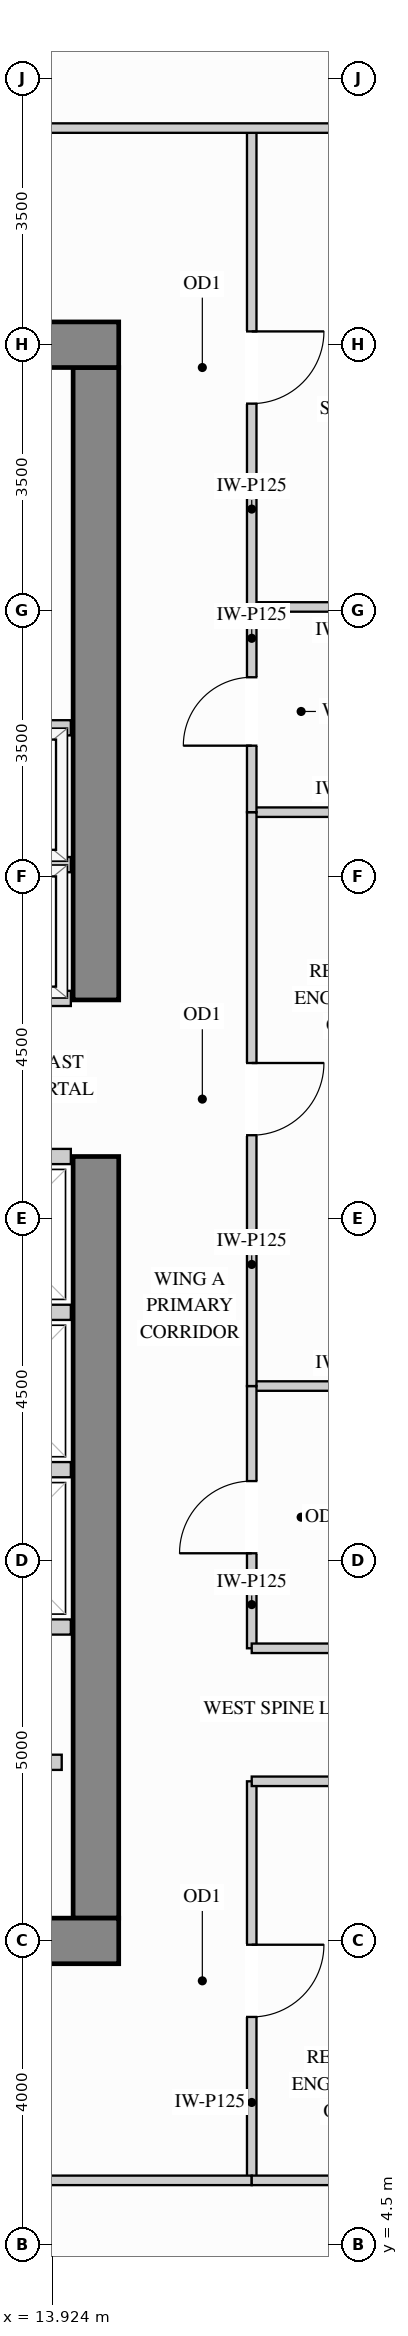
"""IFC4 building model, lengths in metres.
Left out: names, types, materials, properties, quantities, classifications, styles, units other than length and angle.
Written with IfcOpenShell. Run it as: python <this file> out.ifc"""

import sys

from ifc_helpers import new_model, si_unit, direction, frame, frame_2d, origin, place, context, subcontext, project, spatial, rectangle, extrude, source, transform, mapped, element, fill, save


model = new_model("IFC4")
c1 = context("Model", 3, precision=1e-05, world=origin(), true_north=direction((0.0, 1.0)))
c2 = subcontext(c1, "Body", "Model", "MODEL_VIEW")
j1 = project(units=[si_unit("LENGTHUNIT", "METRE"), si_unit("PLANEANGLEUNIT", "RADIAN")], contexts=[c1])
p1 = place(None, origin())
s1 = spatial("IfcSite", under=j1, at=p1, CompositionType="ELEMENT")
p2 = place(p1, origin())
s2 = spatial("IfcBuilding", under=s1, at=p2, CompositionType="ELEMENT")
p3 = place(p2, frame((0.0, 0.0, 186.3)))
s3 = spatial("IfcBuildingStorey", under=s2, at=p3, CompositionType="ELEMENT", Elevation=186.3)
m1 = source(origin(), c2, "Body", "SweptSolid", [
    extrude(rectangle(XDim=10.02, YDim=0.6, at=frame_2d((5.01, 0.0))), origin(), (0.0, 0.0, 1.0), 3.4),
])
p4 = place(p3, frame((14.5, 8.8, 0.0), z_axis=(0.0, 0.0, 1.0), x_axis=(0.0, 1.0, 0.0)))
e1 = element("IfcWall", 1, at=p4, inside=s3, PredefinedType="SHEAR", context=c2, shape_type="MappedRepresentation", body=[
    mapped(m1, transform((0.0, 0.0, 0.0), x_axis=(1.0, 0.0, 0.0), y_axis=(0.0, 1.0, 0.0), z_axis=(0.0, 0.0, 1.0))),
])
m2 = source(origin(), c2, "Body", "SweptSolid", [
    extrude(rectangle(XDim=8.32, YDim=0.6, at=frame_2d((4.16, 0.0))), origin(), (0.0, 0.0, 1.0), 3.4),
])
p5 = place(p3, frame((14.5, 20.88, 0.0), z_axis=(0.0, 0.0, 1.0), x_axis=(0.0, 1.0, 0.0)))
e2 = element("IfcWall", 2, at=p5, inside=s3, PredefinedType="SHEAR", context=c2, shape_type="MappedRepresentation", body=[
    mapped(m2, transform((0.0, 0.0, 0.0), x_axis=(1.0, 0.0, 0.0), y_axis=(0.0, 1.0, 0.0), z_axis=(0.0, 0.0, 1.0))),
])
m3 = source(origin(), c2, "Body", "SweptSolid", [
    extrude(rectangle(XDim=10.6, YDim=0.6, at=frame_2d((5.3, 0.0))), origin(), (0.0, 0.0, 1.0), 3.4),
])
for number, where, z_axis, x_axis in (
    (3, (4.2, 29.5, 0.0), (0.0, 0.0, 1.0), (1.0, 0.0, 0.0)),
    (4, (4.2, 8.5, 0.0), (0.0, 0.0, 1.0), (1.0, 0.0, 0.0)),
):
    element("IfcWall", number, at=place(p3, frame(where, z_axis=z_axis, x_axis=x_axis)), inside=s3, PredefinedType="SHEAR", context=c2, shape_type="MappedRepresentation", body=[
        mapped(m3, transform((0.0, 0.0, 0.0), x_axis=(1.0, 0.0, 0.0), y_axis=(0.0, 1.0, 0.0), z_axis=(0.0, 0.0, 1.0))),
    ])
m4 = source(origin(), c2, "Body", "SweptSolid", [
    extrude(rectangle(XDim=2.6, YDim=0.125, at=frame_2d((1.3, 0.0))), origin(), (0.0, 0.0, 1.0), 3.385),
])
p6 = place(p3, frame((16.55, 15.8, 0.0), z_axis=(0.0, 0.0, 1.0), x_axis=(1.0, 0.0, 0.0)))
e5 = element("IfcWall", 5, at=p6, inside=s3, PredefinedType="PARTITIONING", context=c2, shape_type="MappedRepresentation", body=[
    mapped(m4, transform((0.0, 0.0, 0.0), x_axis=(1.0, 0.0, 0.0), y_axis=(0.0, 1.0, 0.0), z_axis=(0.0, 0.0, 1.0))),
])
m5 = source(origin(), c2, "Body", "SweptSolid", [
    extrude(rectangle(XDim=2.598, YDim=0.125, at=frame_2d((1.299, 0.0))), origin(), (0.0, 0.0, 1.0), 3.385),
])
for number, where, z_axis, x_axis in (
    (6, (16.55, 23.35, 0.0), (0.0, 0.0, 1.0), (1.0, 0.0, 0.0)),
    (7, (16.55, 26.05, 0.0), (0.0, 0.0, 1.0), (1.0, 0.0, 0.0)),
):
    element("IfcWall", number, at=place(p3, frame(where, z_axis=z_axis, x_axis=x_axis)), inside=s3, PredefinedType="PARTITIONING", context=c2, shape_type="MappedRepresentation", body=[
        mapped(m5, transform((0.0, 0.0, 0.0), x_axis=(1.0, 0.0, 0.0), y_axis=(0.0, 1.0, 0.0), z_axis=(0.0, 0.0, 1.0))),
    ])
p7 = place(p3, frame((16.55, 12.35, 0.0), z_axis=(0.0, 0.0, 1.0), x_axis=(0.0, 1.0, 0.0)))
e8 = element("IfcWall", 8, at=p7, inside=s3, PredefinedType="PARTITIONING", context=c2, shape_type="SweptSolid", body=[
    extrude(rectangle(XDim=3.45, YDim=0.125, at=frame_2d((1.725, 0.0))), origin(), (0.0, 0.0, 1.0), 3.385),
])
p8 = place(p7, frame((1.25, 0.0, 0.0)))
e9 = element("IfcOpeningElement", 9, at=p8, cuts=e8, PredefinedType="OPENING", context=c2, shape_type="SweptSolid", body=[
    extrude(rectangle(XDim=0.95, YDim=2.15, at=frame_2d((0.475, 1.075))), frame((0.0, 0.073, 0.0), z_axis=(0.0, -1.0, 0.0), x_axis=(1.0, 0.0, 0.0)), (0.0, 0.0, 1.0), 0.145),
])
p9 = place(p3, frame((16.55, 15.8, 0.0), z_axis=(0.0, 0.0, 1.0), x_axis=(0.0, 1.0, 0.0)))
e10 = element("IfcWall", 10, at=p9, inside=s3, PredefinedType="PARTITIONING", context=c2, shape_type="SweptSolid", body=[
    extrude(rectangle(XDim=7.55, YDim=0.125, at=frame_2d((3.775, 0.0))), origin(), (0.0, 0.0, 1.0), 3.385),
])
p10 = place(p9, frame((3.3, 0.0, 0.0)))
e11 = element("IfcOpeningElement", 11, at=p10, cuts=e10, PredefinedType="OPENING", context=c2, shape_type="SweptSolid", body=[
    extrude(rectangle(XDim=0.95, YDim=2.15, at=frame_2d((0.475, 1.075))), frame((0.0, 0.073, 0.0), z_axis=(0.0, -1.0, 0.0), x_axis=(1.0, 0.0, 0.0)), (0.0, 0.0, 1.0), 0.145),
])
p11 = place(p3, frame((16.55, 26.05, 0.0), z_axis=(0.0, 0.0, 1.0), x_axis=(0.0, 1.0, 0.0)))
e12 = element("IfcWall", 12, at=p11, inside=s3, PredefinedType="PARTITIONING", context=c2, shape_type="SweptSolid", body=[
    extrude(rectangle(XDim=6.3, YDim=0.125, at=frame_2d((3.15, 0.0))), origin(), (0.0, 0.0, 1.0), 3.385),
])
p12 = place(p11, frame((2.675, 0.0, 0.0)))
e13 = element("IfcOpeningElement", 13, at=p12, cuts=e12, PredefinedType="OPENING", context=c2, shape_type="SweptSolid", body=[
    extrude(rectangle(XDim=0.95, YDim=2.15, at=frame_2d((0.475, 1.075))), frame((0.0, 0.073, 0.0), z_axis=(0.0, -1.0, 0.0), x_axis=(1.0, 0.0, 0.0)), (0.0, 0.0, 1.0), 0.145),
])
p13 = place(p3, frame((16.55, 5.35, 0.0), z_axis=(0.0, 0.0, 1.0), x_axis=(0.0, 1.0, 0.0)))
e14 = element("IfcWall", 14, at=p13, inside=s3, PredefinedType="PARTITIONING", context=c2, shape_type="SweptSolid", body=[
    extrude(rectangle(XDim=5.25, YDim=0.125, at=frame_2d((2.625, 0.0))), origin(), (0.0, 0.0, 1.0), 3.385),
])
p14 = place(p13, frame((2.15, 0.0, 0.0)))
e15 = element("IfcOpeningElement", 15, at=p14, cuts=e14, PredefinedType="OPENING", context=c2, shape_type="SweptSolid", body=[
    extrude(rectangle(XDim=0.95, YDim=2.15, at=frame_2d((0.475, 1.075))), frame((0.0, 0.073, 0.0), z_axis=(0.0, -1.0, 0.0), x_axis=(1.0, 0.0, 0.0)), (0.0, 0.0, 1.0), 0.145),
])
p15 = place(p3, frame((16.55, 23.35, 0.0), z_axis=(0.0, 0.0, 1.0), x_axis=(0.0, 1.0, 0.0)))
e16 = element("IfcWall", 16, at=p15, inside=s3, PredefinedType="PARTITIONING", context=c2, shape_type="SweptSolid", body=[
    extrude(rectangle(XDim=2.7, YDim=0.125, at=frame_2d((1.35, 0.0))), origin(), (0.0, 0.0, 1.0), 3.385),
])
p16 = place(p15, frame((0.875, 0.0, 0.0)))
e17 = element("IfcOpeningElement", 17, at=p16, cuts=e16, PredefinedType="OPENING", context=c2, shape_type="SweptSolid", body=[
    extrude(rectangle(XDim=0.9, YDim=2.15, at=frame_2d((0.45, 1.075))), frame((0.0, 0.073, 0.0), z_axis=(0.0, -1.0, 0.0), x_axis=(1.0, 0.0, 0.0)), (0.0, 0.0, 1.0), 0.145),
])
m6 = source(origin(), c2, "Body", "SweptSolid", [
    extrude(rectangle(XDim=5.798, YDim=0.125, at=frame_2d((2.899, 0.0))), origin(), (0.0, 0.0, 1.0), 3.385),
])
p17 = place(p3, frame((13.35, 32.35, 0.0), z_axis=(0.0, 0.0, 1.0), x_axis=(1.0, 0.0, 0.0)))
e18 = element("IfcWall", 18, at=p17, inside=s3, PredefinedType="PARTITIONING", context=c2, shape_type="MappedRepresentation", body=[
    mapped(m6, transform((0.0, 0.0, 0.0), x_axis=(1.0, 0.0, 0.0), y_axis=(0.0, 1.0, 0.0), z_axis=(0.0, 0.0, 1.0))),
])
m7 = source(origin(), c2, "Body", "SweptSolid", [
    extrude(rectangle(XDim=2.95, YDim=0.125, at=frame_2d((1.475, 0.0))), origin(), (0.0, 0.0, 1.0), 3.385),
])
for number, where, z_axis, x_axis in (
    (19, (16.55, 12.35, 0.0), (0.0, 0.0, 1.0), (1.0, 0.0, 0.0)),
    (20, (16.55, 10.6, 0.0), (0.0, 0.0, 1.0), (1.0, 0.0, 0.0)),
):
    element("IfcWall", number, at=place(p3, frame(where, z_axis=z_axis, x_axis=x_axis)), inside=s3, PredefinedType="PARTITIONING", context=c2, shape_type="MappedRepresentation", body=[
        mapped(m7, transform((0.0, 0.0, 0.0), x_axis=(1.0, 0.0, 0.0), y_axis=(0.0, 1.0, 0.0), z_axis=(0.0, 0.0, 1.0))),
    ])
p18 = place(p3, frame((8.889, 5.35, 0.0), z_axis=(0.0, 0.0, 1.0), x_axis=(1.0, 0.0, 0.0)))
e21 = element("IfcWall", 21, at=p18, inside=s3, PredefinedType="PARTITIONING", context=c2, shape_type="SweptSolid", body=[
    extrude(rectangle(XDim=7.661, YDim=0.125, at=frame_2d((3.831, 0.0))), origin(), (0.0, 0.0, 1.0), 3.385),
])
p19 = place(p18, frame((3.355, 0.0, 0.0)))
e22 = element("IfcOpeningElement", 22, at=p19, cuts=e21, PredefinedType="OPENING", context=c2, shape_type="SweptSolid", body=[
    extrude(rectangle(XDim=0.95, YDim=2.15, at=frame_2d((0.475, 1.075))), frame((0.0, 0.073, 0.0), z_axis=(0.0, -1.0, 0.0), x_axis=(1.0, 0.0, 0.0)), (0.0, 0.0, 1.0), 0.145),
])
p20 = place(p3, frame((16.55, 5.35, 0.0), z_axis=(0.0, 0.0, 1.0), x_axis=(1.0, 0.0, 0.0)))
e23 = element("IfcWall", 23, at=p20, inside=s3, PredefinedType="PARTITIONING", context=c2, shape_type="MappedRepresentation", body=[
    mapped(m5, transform((0.0, 0.0, 0.0), x_axis=(1.0, 0.0, 0.0), y_axis=(0.0, 1.0, 0.0), z_axis=(0.0, 0.0, 1.0))),
])
m8 = source(origin(), c2, "Body", "SweptSolid", [
    extrude(rectangle(XDim=1.63, YDim=0.2, at=frame_2d((0.815, 0.0))), origin(), (0.0, 0.0, 1.0), 3.385),
])
p21 = place(p3, frame((12.42, 10.85, 0.0), z_axis=(0.0, 0.0, 1.0), x_axis=(1.0, 0.0, 0.0)))
e24 = element("IfcWall", 24, at=p21, inside=s3, PredefinedType="PARTITIONING", context=c2, shape_type="MappedRepresentation", body=[
    mapped(m8, transform((0.0, 0.0, 0.0), x_axis=(1.0, 0.0, 0.0), y_axis=(0.0, 1.0, 0.0), z_axis=(0.0, 0.0, 1.0))),
])
m9 = source(origin(), c2, "Body", "SweptSolid", [
    extrude(rectangle(XDim=2.34, YDim=0.2, at=frame_2d((1.17, 0.0))), origin(), (0.0, 0.0, 1.0), 3.385),
])
for number, where, z_axis, x_axis in (
    (25, (11.83, 22.66, 0.0), (0.0, 0.0, 1.0), (1.0, 0.0, 0.0)),
    (26, (11.83, 20.9, 0.0), (0.0, 0.0, 1.0), (1.0, 0.0, 0.0)),
    (27, (11.83, 24.46, 0.0), (0.0, 0.0, 1.0), (1.0, 0.0, 0.0)),
):
    element("IfcWall", number, at=place(p3, frame(where, z_axis=z_axis, x_axis=x_axis)), inside=s3, PredefinedType="PARTITIONING", context=c2, shape_type="MappedRepresentation", body=[
        mapped(m9, transform((0.0, 0.0, 0.0), x_axis=(1.0, 0.0, 0.0), y_axis=(0.0, 1.0, 0.0), z_axis=(0.0, 0.0, 1.0))),
    ])
m10 = source(origin(), c2, "Body", "SweptSolid", [
    extrude(rectangle(XDim=1.94, YDim=0.2, at=frame_2d((0.97, 0.0))), origin(), (0.0, 0.0, 1.0), 3.385),
])
for number, where, z_axis, x_axis in (
    (28, (12.23, 14.7, 0.0), (0.0, 0.0, 1.0), (1.0, 0.0, 0.0)),
    (29, (12.23, 12.63, 0.0), (0.0, 0.0, 1.0), (1.0, 0.0, 0.0)),
    (30, (12.23, 16.77, 0.0), (0.0, 0.0, 1.0), (1.0, 0.0, 0.0)),
    (31, (12.23, 18.82, 0.0), (0.0, 0.0, 1.0), (1.0, 0.0, 0.0)),
):
    element("IfcWall", number, at=place(p3, frame(where, z_axis=z_axis, x_axis=x_axis)), inside=s3, PredefinedType="PARTITIONING", context=c2, shape_type="MappedRepresentation", body=[
        mapped(m10, transform((0.0, 0.0, 0.0), x_axis=(1.0, 0.0, 0.0), y_axis=(0.0, 1.0, 0.0), z_axis=(0.0, 0.0, 1.0))),
    ])
m11 = source(origin(), c2, "Body", "SweptSolid", [
    extrude(rectangle(XDim=0.95, YDim=2.15, at=frame_2d((0.475, 1.075))), frame((0.0, 0.025, 0.0), z_axis=(0.0, -1.0, 0.0), x_axis=(1.0, 0.0, 0.0)), (0.0, 0.0, 1.0), 0.05),
])
p22 = place(p14, origin())
e32 = element("IfcDoor", 32, at=p22, inside=s3, OperationType="SINGLE_SWING_RIGHT", PredefinedType="DOOR", context=c2, shape_type="MappedRepresentation", body=[
    mapped(m11, transform((0.0, 0.0, 0.0), x_axis=(1.0, 0.0, 0.0), y_axis=(0.0, 1.0, 0.0), z_axis=(0.0, 0.0, 1.0))),
])
fill(e15, e32)
p23 = place(p8, origin())
e33 = element("IfcDoor", 33, at=p23, inside=s3, OperationType="SINGLE_SWING_LEFT", PredefinedType="DOOR", context=c2, shape_type="MappedRepresentation", body=[
    mapped(m11, transform((0.0, 0.0, 0.0), x_axis=(1.0, 0.0, 0.0), y_axis=(0.0, 1.0, 0.0), z_axis=(0.0, 0.0, 1.0))),
])
fill(e9, e33)
p24 = place(p10, origin())
e34 = element("IfcDoor", 34, at=p24, inside=s3, OperationType="SINGLE_SWING_RIGHT", PredefinedType="DOOR", context=c2, shape_type="MappedRepresentation", body=[
    mapped(m11, transform((0.0, 0.0, 0.0), x_axis=(1.0, 0.0, 0.0), y_axis=(0.0, 1.0, 0.0), z_axis=(0.0, 0.0, 1.0))),
])
fill(e11, e34)
p25 = place(p12, origin())
e35 = element("IfcDoor", 35, at=p25, inside=s3, OperationType="SINGLE_SWING_RIGHT", PredefinedType="DOOR", context=c2, shape_type="MappedRepresentation", body=[
    mapped(m11, transform((0.0, 0.0, 0.0), x_axis=(1.0, 0.0, 0.0), y_axis=(0.0, 1.0, 0.0), z_axis=(0.0, 0.0, 1.0))),
])
fill(e13, e35)
m12 = source(origin(), c2, "Body", "SweptSolid", [
    extrude(rectangle(XDim=0.9, YDim=2.15, at=frame_2d((0.45, 1.075))), frame((0.0, 0.025, 0.0), z_axis=(0.0, -1.0, 0.0), x_axis=(1.0, 0.0, 0.0)), (0.0, 0.0, 1.0), 0.05),
])
p26 = place(p16, origin())
e36 = element("IfcDoor", 36, at=p26, inside=s3, OperationType="SINGLE_SWING_LEFT", PredefinedType="DOOR", context=c2, shape_type="MappedRepresentation", body=[
    mapped(m12, transform((0.0, 0.0, 0.0), x_axis=(1.0, 0.0, 0.0), y_axis=(0.0, 1.0, 0.0), z_axis=(0.0, 0.0, 1.0))),
])
fill(e17, e36)
save(model, sys.argv[1])
